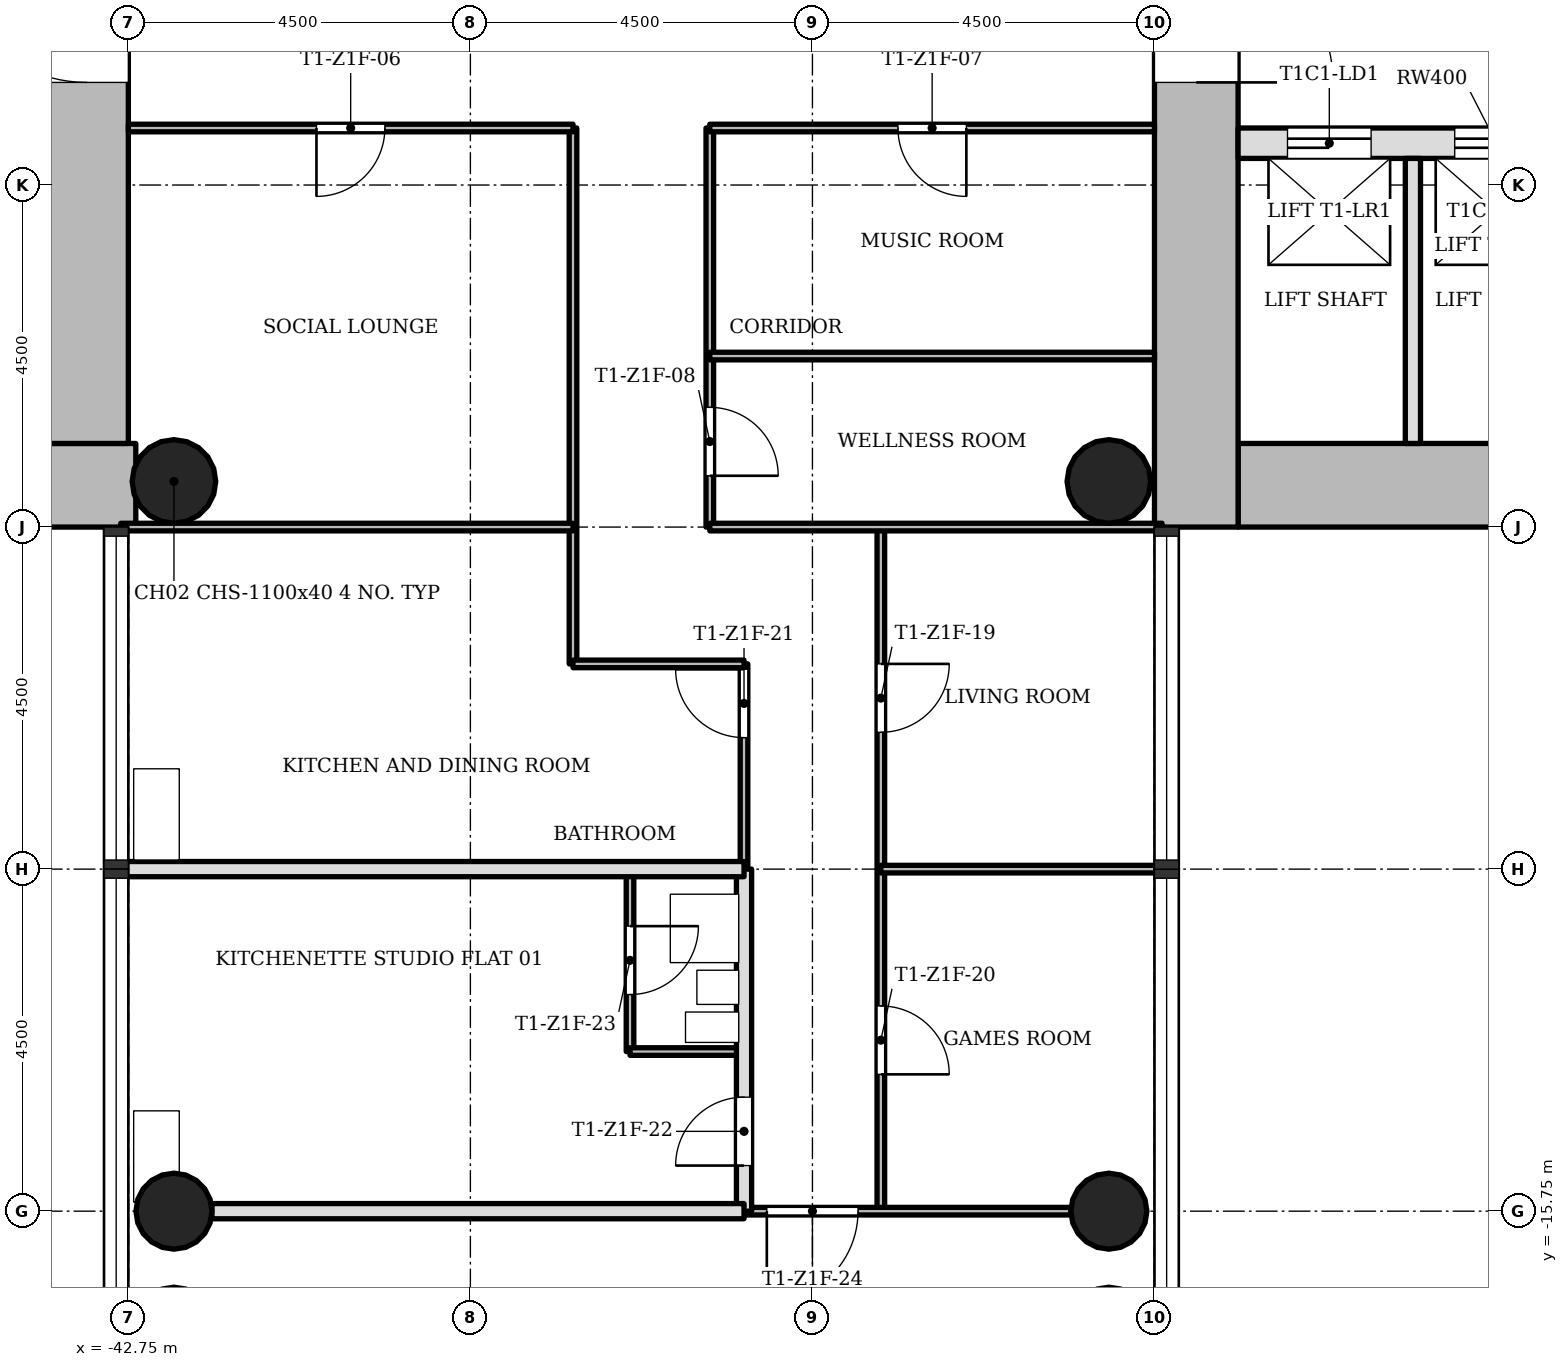
"""IFC4 building model, lengths in metres.
Left out: names, types, materials, properties, quantities, classifications, styles, units other than length and angle.
Written with IfcOpenShell. Run it as: python <this file> out.ifc"""

import sys

from ifc_helpers import new_model, si_unit, direction, frame, frame_2d, origin, origin_2d, place, context, subcontext, project, spatial, rectangle, hollow_circle, extrude, element, fill, save


model = new_model("IFC4")
c1 = context("Model", 3, precision=1e-05, world=origin(), true_north=direction((0.0, 1.0)))
c2 = subcontext(c1, "Body", "Model", "MODEL_VIEW")
j1 = project(units=[si_unit("LENGTHUNIT", "METRE"), si_unit("PLANEANGLEUNIT", "RADIAN")], contexts=[c1])
p1 = place(None, origin())
s1 = spatial("IfcSite", under=j1, at=p1, CompositionType="ELEMENT")
p2 = place(p1, origin())
s2 = spatial("IfcBuilding", under=s1, at=p2, CompositionType="ELEMENT")
p3 = place(p2, frame((0.0, 0.0, 68.7)))
s3 = spatial("IfcBuildingStorey", under=s2, at=p3, CompositionType="ELEMENT", Elevation=68.7)
p4 = place(p3, frame((-28.15, -6.2, 0.0), z_axis=(0.0, 0.0, 1.0), x_axis=(1.0, 0.0, 0.0)))
e1 = element("IfcWall", 1, at=p4, inside=s3, PredefinedType="SHEAR", context=c2, shape_type="SweptSolid", body=[
    extrude(rectangle(XDim=7.9, YDim=1.1, at=frame_2d((3.95, 0.0))), origin(), (0.0, 0.0, 1.0), 3.4),
])
p5 = place(p3, frame((-28.7, 5.65, 0.0), z_axis=(0.0, 0.0, 1.0), x_axis=(0.0, -1.0, 0.0)))
e2 = element("IfcWall", 2, at=p5, inside=s3, PredefinedType="SHEAR", context=c2, shape_type="SweptSolid", body=[
    extrude(rectangle(XDim=12.4, YDim=1.1, at=frame_2d((6.2, 0.0))), origin(), (0.0, 0.0, 1.0), 3.4),
])
p6 = place(p5, frame((4.75, 0.0, 0.0)))
e3 = element("IfcOpeningElement", 3, at=p6, cuts=e2, PredefinedType="OPENING", context=c2, shape_type="SweptSolid", body=[
    extrude(rectangle(XDim=1.8, YDim=2.1, at=frame_2d((0.9, 1.05))), frame((0.0, 0.56, 0.0), z_axis=(0.0, -1.0, 0.0), x_axis=(1.0, 0.0, 0.0)), (0.0, 0.0, 1.0), 1.12),
])
p7 = place(p3, frame((-28.15, -1.7, 0.0), z_axis=(0.0, 0.0, 1.0), x_axis=(1.0, 0.0, 0.0)))
e4 = element("IfcWall", 4, at=p7, inside=s3, PredefinedType="SHEAR", context=c2, shape_type="SweptSolid", body=[
    extrude(rectangle(XDim=6.8, YDim=0.4, at=frame_2d((3.4, 0.0))), origin(), (0.0, 0.0, 1.0), 3.4),
])
p8 = place(p7, frame((0.65, 0.0, 0.0)))
e5 = element("IfcOpeningElement", 5, at=p8, cuts=e4, PredefinedType="OPENING", context=c2, shape_type="SweptSolid", body=[
    extrude(rectangle(XDim=1.1, YDim=2.1, at=frame_2d((0.55, 1.05))), frame((0.0, 0.21, 0.0), z_axis=(0.0, -1.0, 0.0), x_axis=(1.0, 0.0, 0.0)), (0.0, 0.0, 1.0), 0.42),
])
p9 = place(p7, frame((2.85, 0.0, 0.0)))
e6 = element("IfcOpeningElement", 6, at=p9, cuts=e4, PredefinedType="OPENING", context=c2, shape_type="SweptSolid", body=[
    extrude(rectangle(XDim=1.1, YDim=2.1, at=frame_2d((0.55, 1.05))), frame((0.0, 0.21, 0.0), z_axis=(0.0, -1.0, 0.0), x_axis=(1.0, 0.0, 0.0)), (0.0, 0.0, 1.0), 0.42),
])
p10 = place(p7, frame((5.05, 0.0, 0.0)))
e7 = element("IfcOpeningElement", 7, at=p10, cuts=e4, PredefinedType="OPENING", context=c2, shape_type="SweptSolid", body=[
    extrude(rectangle(XDim=1.1, YDim=2.1, at=frame_2d((0.55, 1.05))), frame((0.0, 0.21, 0.0), z_axis=(0.0, -1.0, 0.0), x_axis=(1.0, 0.0, 0.0)), (0.0, 0.0, 1.0), 0.42),
])
p11 = place(p3, frame((-50.65, -6.2, 0.0), z_axis=(0.0, 0.0, 1.0), x_axis=(1.0, 0.0, 0.0)))
e8 = element("IfcWall", 8, at=p11, inside=s3, PredefinedType="SHEAR", context=c2, shape_type="SweptSolid", body=[
    extrude(rectangle(XDim=7.998, YDim=1.1, at=frame_2d((3.999, 0.0))), origin(), (0.0, 0.0, 1.0), 3.4),
])
p12 = place(p3, frame((-43.3, -5.65, 0.0), z_axis=(0.0, 0.0, 1.0), x_axis=(0.0, 1.0, 0.0)))
e9 = element("IfcWall", 9, at=p12, inside=s3, PredefinedType="SHEAR", context=c2, shape_type="SweptSolid", body=[
    extrude(rectangle(XDim=12.4, YDim=1.1, at=frame_2d((6.2, 0.0))), origin(), (0.0, 0.0, 1.0), 3.4),
])
p13 = place(p12, frame((4.75, 0.0, 0.0)))
e10 = element("IfcOpeningElement", 10, at=p13, cuts=e9, PredefinedType="OPENING", context=c2, shape_type="SweptSolid", body=[
    extrude(rectangle(XDim=1.8, YDim=2.1, at=frame_2d((0.9, 1.05))), frame((0.0, 0.56, 0.0), z_axis=(0.0, -1.0, 0.0), x_axis=(1.0, 0.0, 0.0)), (0.0, 0.0, 1.0), 1.12),
])
for number, where, z_axis, x_axis in (
    (11, (-42.15, -15.75, 0.0), (0.0, 0.0, 1.0), (1.0, 0.0, 0.0)),
    (12, (-29.85, -15.75, 0.0), (0.0, 0.0, 1.0), (1.0, 0.0, 0.0)),
):
    element("IfcColumn", number, at=place(p3, frame(where, z_axis=z_axis, x_axis=x_axis)), inside=s3, PredefinedType="COLUMN", context=c2, shape_type="SweptSolid", body=[
        extrude(hollow_circle(Radius=0.5, WallThickness=0.036, at=origin_2d()), origin(), (0.0, 0.0, 1.0), 3.4),
    ])
for number, where, z_axis, x_axis in (
    (13, (-42.15, -6.15, 0.0), (0.0, 0.0, 1.0), (1.0, 0.0, 0.0)),
    (14, (-29.85, -6.15, 0.0), (0.0, 0.0, 1.0), (1.0, 0.0, 0.0)),
):
    element("IfcColumn", number, at=place(p3, frame(where, z_axis=z_axis, x_axis=x_axis)), inside=s3, PredefinedType="COLUMN", context=c2, shape_type="SweptSolid", body=[
        extrude(hollow_circle(Radius=0.55, WallThickness=0.04, at=origin_2d()), origin(), (0.0, 0.0, 1.0), 3.4),
    ])
p14 = place(p3, frame((-25.85, -5.65, 0.0), z_axis=(0.0, 0.0, 1.0), x_axis=(0.0, 1.0, 0.0)))
e15 = element("IfcWall", 15, at=p14, inside=s3, PredefinedType="SOLIDWALL", context=c2, shape_type="SweptSolid", body=[
    extrude(rectangle(XDim=3.75, YDim=0.2, at=frame_2d((1.875, 0.0))), origin(), (0.0, 0.0, 1.0), 3.0),
])
p15 = place(p3, frame((-36.9, -8.55, 0.0), z_axis=(0.0, 0.0, 1.0), x_axis=(0.0, 1.0, 0.0)))
e16 = element("IfcWall", 16, at=p15, inside=s3, PredefinedType="PARTITIONING", context=c2, shape_type="SweptSolid", body=[
    extrude(rectangle(XDim=7.05, YDim=0.1, at=frame_2d((3.525, 0.0))), origin(), (0.0, 0.0, 1.0), 3.0),
])
p16 = place(p3, frame((-36.15, -13.65, 0.0), z_axis=(0.0, 0.0, 1.0), x_axis=(0.0, 1.0, 0.0)))
e17 = element("IfcWall", 17, at=p16, inside=s3, PredefinedType="PARTITIONING", context=c2, shape_type="SweptSolid", body=[
    extrude(rectangle(XDim=2.4, YDim=0.1, at=frame_2d((1.2, 0.0))), origin(), (0.0, 0.0, 1.0), 3.0),
])
p17 = place(p16, frame((0.75, 0.0, 0.0)))
e18 = element("IfcOpeningElement", 18, at=p17, cuts=e17, PredefinedType="OPENING", context=c2, shape_type="SweptSolid", body=[
    extrude(rectangle(XDim=0.9, YDim=2.1, at=frame_2d((0.45, 1.05))), frame((0.0, 0.06, 0.0), z_axis=(0.0, -1.0, 0.0), x_axis=(1.0, 0.0, 0.0)), (0.0, 0.0, 1.0), 0.12),
])
p18 = place(p3, frame((-35.1, -6.75, 0.0), z_axis=(0.0, 0.0, 1.0), x_axis=(0.0, 1.0, 0.0)))
e19 = element("IfcWall", 19, at=p18, inside=s3, PredefinedType="PARTITIONING", context=c2, shape_type="SweptSolid", body=[
    extrude(rectangle(XDim=5.25, YDim=0.1, at=frame_2d((2.625, 0.0))), origin(), (0.0, 0.0, 1.0), 3.0),
])
p19 = place(p18, frame((0.675, 0.0, 0.0)))
e20 = element("IfcOpeningElement", 20, at=p19, cuts=e19, PredefinedType="OPENING", context=c2, shape_type="SweptSolid", body=[
    extrude(rectangle(XDim=0.9, YDim=2.1, at=frame_2d((0.45, 1.05))), frame((0.0, 0.06, 0.0), z_axis=(0.0, -1.0, 0.0), x_axis=(1.0, 0.0, 0.0)), (0.0, 0.0, 1.0), 0.12),
])
p20 = place(p3, frame((-34.65, -11.25, 0.0), z_axis=(0.0, 0.0, 1.0), x_axis=(0.0, 1.0, 0.0)))
e21 = element("IfcWall", 21, at=p20, inside=s3, PredefinedType="PARTITIONING", context=c2, shape_type="SweptSolid", body=[
    extrude(rectangle(XDim=2.7, YDim=0.1, at=frame_2d((1.35, 0.0))), origin(), (0.0, 0.0, 1.0), 3.0),
])
p21 = place(p20, frame((1.73, 0.0, 0.0)))
e22 = element("IfcOpeningElement", 22, at=p21, cuts=e21, PredefinedType="OPENING", context=c2, shape_type="SweptSolid", body=[
    extrude(rectangle(XDim=0.9, YDim=2.1, at=frame_2d((0.45, 1.05))), frame((0.0, 0.06, 0.0), z_axis=(0.0, -1.0, 0.0), x_axis=(1.0, 0.0, 0.0)), (0.0, 0.0, 1.0), 0.12),
])
p22 = place(p3, frame((-34.65, -15.75, 0.0), z_axis=(0.0, 0.0, 1.0), x_axis=(0.0, 1.0, 0.0)))
e23 = element("IfcWall", 23, at=p22, inside=s3, PredefinedType="SOLIDWALL", context=c2, shape_type="SweptSolid", body=[
    extrude(rectangle(XDim=4.5, YDim=0.2, at=frame_2d((2.25, 0.0))), origin(), (0.0, 0.0, 1.0), 3.0),
])
p23 = place(p22, frame((0.6, 0.0, 0.0)))
e24 = element("IfcOpeningElement", 24, at=p23, cuts=e23, PredefinedType="OPENING", context=c2, shape_type="SweptSolid", body=[
    extrude(rectangle(XDim=0.9, YDim=2.1, at=frame_2d((0.45, 1.05))), frame((0.0, 0.11, 0.0), z_axis=(0.0, -1.0, 0.0), x_axis=(1.0, 0.0, 0.0)), (0.0, 0.0, 1.0), 0.22),
])
p24 = place(p3, frame((-32.85, -15.75, 0.0), z_axis=(0.0, 0.0, 1.0), x_axis=(0.0, 1.0, 0.0)))
e25 = element("IfcWall", 25, at=p24, inside=s3, PredefinedType="PARTITIONING", context=c2, shape_type="SweptSolid", body=[
    extrude(rectangle(XDim=9.0, YDim=0.1, at=frame_2d((4.5, 0.0))), origin(), (0.0, 0.0, 1.0), 3.0),
])
p25 = place(p24, frame((6.3, 0.0, 0.0)))
e26 = element("IfcOpeningElement", 26, at=p25, cuts=e25, PredefinedType="OPENING", context=c2, shape_type="SweptSolid", body=[
    extrude(rectangle(XDim=0.9, YDim=2.1, at=frame_2d((0.45, 1.05))), frame((0.0, 0.06, 0.0), z_axis=(0.0, -1.0, 0.0), x_axis=(1.0, 0.0, 0.0)), (0.0, 0.0, 1.0), 0.12),
])
p26 = place(p24, frame((1.8, 0.0, 0.0)))
e27 = element("IfcOpeningElement", 27, at=p26, cuts=e25, PredefinedType="OPENING", context=c2, shape_type="SweptSolid", body=[
    extrude(rectangle(XDim=0.9, YDim=2.1, at=frame_2d((0.45, 1.05))), frame((0.0, 0.06, 0.0), z_axis=(0.0, -1.0, 0.0), x_axis=(1.0, 0.0, 0.0)), (0.0, 0.0, 1.0), 0.12),
])
p27 = place(p3, frame((-34.65, -15.75, 0.0), z_axis=(0.0, 0.0, 1.0), x_axis=(1.0, 0.0, 0.0)))
e28 = element("IfcWall", 28, at=p27, inside=s3, PredefinedType="PARTITIONING", context=c2, shape_type="SweptSolid", body=[
    extrude(rectangle(XDim=4.3, YDim=0.1, at=frame_2d((2.15, 0.0))), origin(), (0.0, 0.0, 1.0), 3.0),
])
p28 = place(p27, frame((0.3, 0.0, 0.0)))
e29 = element("IfcOpeningElement", 29, at=p28, cuts=e28, PredefinedType="OPENING", context=c2, shape_type="SweptSolid", body=[
    extrude(rectangle(XDim=1.2, YDim=2.1, at=frame_2d((0.6, 1.05))), frame((0.0, 0.06, 0.0), z_axis=(0.0, -1.0, 0.0), x_axis=(1.0, 0.0, 0.0)), (0.0, 0.0, 1.0), 0.12),
])
p29 = place(p3, frame((-41.65, -15.75, 0.0), z_axis=(0.0, 0.0, 1.0), x_axis=(1.0, 0.0, 0.0)))
e30 = element("IfcWall", 30, at=p29, inside=s3, PredefinedType="SOLIDWALL", context=c2, shape_type="SweptSolid", body=[
    extrude(rectangle(XDim=7.0, YDim=0.2, at=frame_2d((3.5, 0.0))), origin(), (0.0, 0.0, 1.0), 3.0),
])
p30 = place(p3, frame((-36.15, -13.65, 0.0), z_axis=(0.0, 0.0, 1.0), x_axis=(1.0, 0.0, 0.0)))
e31 = element("IfcWall", 31, at=p30, inside=s3, PredefinedType="PARTITIONING", context=c2, shape_type="SweptSolid", body=[
    extrude(rectangle(XDim=1.5, YDim=0.1, at=frame_2d((0.75, 0.0))), origin(), (0.0, 0.0, 1.0), 3.0),
])
p31 = place(p3, frame((-32.85, -11.25, 0.0), z_axis=(0.0, 0.0, 1.0), x_axis=(1.0, 0.0, 0.0)))
e32 = element("IfcWall", 32, at=p31, inside=s3, PredefinedType="PARTITIONING", context=c2, shape_type="SweptSolid", body=[
    extrude(rectangle(XDim=3.7, YDim=0.1, at=frame_2d((1.85, 0.0))), origin(), (0.0, 0.0, 1.0), 3.0),
])
p32 = place(p3, frame((-42.85, -11.25, 0.0), z_axis=(0.0, 0.0, 1.0), x_axis=(1.0, 0.0, 0.0)))
e33 = element("IfcWall", 33, at=p32, inside=s3, PredefinedType="SOLIDWALL", context=c2, shape_type="SweptSolid", body=[
    extrude(rectangle(XDim=8.2, YDim=0.2, at=frame_2d((4.1, 0.0))), origin(), (0.0, 0.0, 1.0), 3.0),
])
p33 = place(p3, frame((-36.9, -8.55, 0.0), z_axis=(0.0, 0.0, 1.0), x_axis=(1.0, 0.0, 0.0)))
e34 = element("IfcWall", 34, at=p33, inside=s3, PredefinedType="PARTITIONING", context=c2, shape_type="SweptSolid", body=[
    extrude(rectangle(XDim=2.25, YDim=0.1, at=frame_2d((1.125, 0.0))), origin(), (0.0, 0.0, 1.0), 3.0),
])
for number, where, z_axis, x_axis in (
    (35, (-42.85, -6.75, 0.0), (0.0, 0.0, 1.0), (1.0, 0.0, 0.0)),
    (36, (-35.1, -6.75, 0.0), (0.0, 0.0, 1.0), (1.0, 0.0, 0.0)),
):
    element("IfcWall", number, at=place(p3, frame(where, z_axis=z_axis, x_axis=x_axis)), inside=s3, PredefinedType="PARTITIONING", context=c2, shape_type="SweptSolid", body=[
        extrude(rectangle(XDim=5.95, YDim=0.1, at=frame_2d((2.975, 0.0))), origin(), (0.0, 0.0, 1.0), 3.0),
    ])
p34 = place(p3, frame((-35.1, -4.5, 0.0), z_axis=(0.0, 0.0, 1.0), x_axis=(1.0, 0.0, 0.0)))
e37 = element("IfcWall", 37, at=p34, inside=s3, PredefinedType="PARTITIONING", context=c2, shape_type="SweptSolid", body=[
    extrude(rectangle(XDim=5.85, YDim=0.1, at=frame_2d((2.925, 0.0))), origin(), (0.0, 0.0, 1.0), 3.0),
])
p35 = place(p3, frame((-42.75, -1.5, 0.0), z_axis=(0.0, 0.0, 1.0), x_axis=(1.0, 0.0, 0.0)))
e38 = element("IfcWall", 38, at=p35, inside=s3, PredefinedType="PARTITIONING", context=c2, shape_type="SweptSolid", body=[
    extrude(rectangle(XDim=5.85, YDim=0.1, at=frame_2d((2.925, 0.0))), origin(), (0.0, 0.0, 1.0), 3.0),
])
p36 = place(p35, frame((2.475, 0.0, 0.0)))
e39 = element("IfcOpeningElement", 39, at=p36, cuts=e38, PredefinedType="OPENING", context=c2, shape_type="SweptSolid", body=[
    extrude(rectangle(XDim=0.9, YDim=2.1, at=frame_2d((0.45, 1.05))), frame((0.0, 0.06, 0.0), z_axis=(0.0, -1.0, 0.0), x_axis=(1.0, 0.0, 0.0)), (0.0, 0.0, 1.0), 0.12),
])
p37 = place(p3, frame((-35.1, -1.5, 0.0), z_axis=(0.0, 0.0, 1.0), x_axis=(1.0, 0.0, 0.0)))
e40 = element("IfcWall", 40, at=p37, inside=s3, PredefinedType="PARTITIONING", context=c2, shape_type="SweptSolid", body=[
    extrude(rectangle(XDim=5.85, YDim=0.1, at=frame_2d((2.925, 0.0))), origin(), (0.0, 0.0, 1.0), 3.0),
])
p38 = place(p37, frame((2.475, 0.0, 0.0)))
e41 = element("IfcOpeningElement", 41, at=p38, cuts=e40, PredefinedType="OPENING", context=c2, shape_type="SweptSolid", body=[
    extrude(rectangle(XDim=0.9, YDim=2.1, at=frame_2d((0.45, 1.05))), frame((0.0, 0.06, 0.0), z_axis=(0.0, -1.0, 0.0), x_axis=(1.0, 0.0, 0.0)), (0.0, 0.0, 1.0), 0.12),
])
p39 = place(p36, origin())
e42 = element("IfcDoor", 42, at=p39, inside=s3, OperationType="SINGLE_SWING_LEFT", PredefinedType="DOOR", context=c2, shape_type="SweptSolid", body=[
    extrude(rectangle(XDim=0.9, YDim=2.1, at=frame_2d((0.45, 1.05))), frame((0.0, 0.025, 0.0), z_axis=(0.0, -1.0, 0.0), x_axis=(1.0, 0.0, 0.0)), (0.0, 0.0, 1.0), 0.05),
])
fill(e39, e42)
p40 = place(p38, origin())
e43 = element("IfcDoor", 43, at=p40, inside=s3, OperationType="SINGLE_SWING_RIGHT", PredefinedType="DOOR", context=c2, shape_type="SweptSolid", body=[
    extrude(rectangle(XDim=0.9, YDim=2.1, at=frame_2d((0.45, 1.05))), frame((0.0, 0.025, 0.0), z_axis=(0.0, -1.0, 0.0), x_axis=(1.0, 0.0, 0.0)), (0.0, 0.0, 1.0), 0.05),
])
fill(e41, e43)
p41 = place(p19, origin())
e44 = element("IfcDoor", 44, at=p41, inside=s3, OperationType="SINGLE_SWING_LEFT", PredefinedType="DOOR", context=c2, shape_type="SweptSolid", body=[
    extrude(rectangle(XDim=0.9, YDim=2.1, at=frame_2d((0.45, 1.05))), frame((0.0, 0.025, 0.0), z_axis=(0.0, -1.0, 0.0), x_axis=(1.0, 0.0, 0.0)), (0.0, 0.0, 1.0), 0.05),
])
fill(e20, e44)
p42 = place(p25, origin())
e45 = element("IfcDoor", 45, at=p42, inside=s3, OperationType="SINGLE_SWING_RIGHT", PredefinedType="DOOR", context=c2, shape_type="SweptSolid", body=[
    extrude(rectangle(XDim=0.9, YDim=2.1, at=frame_2d((0.45, 1.05))), frame((0.0, 0.025, 0.0), z_axis=(0.0, -1.0, 0.0), x_axis=(1.0, 0.0, 0.0)), (0.0, 0.0, 1.0), 0.05),
])
fill(e26, e45)
p43 = place(p26, origin())
e46 = element("IfcDoor", 46, at=p43, inside=s3, OperationType="SINGLE_SWING_LEFT", PredefinedType="DOOR", context=c2, shape_type="SweptSolid", body=[
    extrude(rectangle(XDim=0.9, YDim=2.1, at=frame_2d((0.45, 1.05))), frame((0.0, 0.025, 0.0), z_axis=(0.0, -1.0, 0.0), x_axis=(1.0, 0.0, 0.0)), (0.0, 0.0, 1.0), 0.05),
])
fill(e27, e46)
p44 = place(p21, origin())
e47 = element("IfcDoor", 47, at=p44, inside=s3, OperationType="SINGLE_SWING_LEFT", PredefinedType="DOOR", context=c2, shape_type="SweptSolid", body=[
    extrude(rectangle(XDim=0.9, YDim=2.1, at=frame_2d((0.45, 1.05))), frame((0.0, 0.025, 0.0), z_axis=(0.0, -1.0, 0.0), x_axis=(1.0, 0.0, 0.0)), (0.0, 0.0, 1.0), 0.05),
])
fill(e22, e47)
p45 = place(p23, origin())
e48 = element("IfcDoor", 48, at=p45, inside=s3, OperationType="SINGLE_SWING_RIGHT", PredefinedType="DOOR", context=c2, shape_type="SweptSolid", body=[
    extrude(rectangle(XDim=0.9, YDim=2.1, at=frame_2d((0.45, 1.05))), frame((0.0, 0.025, 0.0), z_axis=(0.0, -1.0, 0.0), x_axis=(1.0, 0.0, 0.0)), (0.0, 0.0, 1.0), 0.05),
])
fill(e24, e48)
p46 = place(p17, origin())
e49 = element("IfcDoor", 49, at=p46, inside=s3, OperationType="SINGLE_SWING_RIGHT", PredefinedType="DOOR", context=c2, shape_type="SweptSolid", body=[
    extrude(rectangle(XDim=0.9, YDim=2.1, at=frame_2d((0.45, 1.05))), frame((0.0, 0.025, 0.0), z_axis=(0.0, -1.0, 0.0), x_axis=(1.0, 0.0, 0.0)), (0.0, 0.0, 1.0), 0.05),
])
fill(e18, e49)
p47 = place(p28, origin())
e50 = element("IfcDoor", 50, at=p47, inside=s3, OperationType="SINGLE_SWING_LEFT", PredefinedType="DOOR", context=c2, shape_type="SweptSolid", body=[
    extrude(rectangle(XDim=1.2, YDim=2.1, at=frame_2d((0.6, 1.05))), frame((0.0, 0.025, 0.0), z_axis=(0.0, -1.0, 0.0), x_axis=(1.0, 0.0, 0.0)), (0.0, 0.0, 1.0), 0.05),
])
fill(e29, e50)
p48 = place(p8, origin())
e51 = element("IfcDoor", 51, at=p48, inside=s3, OperationType="SLIDING_TO_LEFT", PredefinedType="DOOR", context=c2, shape_type="SweptSolid", body=[
    extrude(rectangle(XDim=1.1, YDim=2.1, at=frame_2d((0.55, 1.05))), frame((0.0, 0.025, 0.0), z_axis=(0.0, -1.0, 0.0), x_axis=(1.0, 0.0, 0.0)), (0.0, 0.0, 1.0), 0.05),
])
fill(e5, e51)
p49 = place(p9, origin())
e52 = element("IfcDoor", 52, at=p49, inside=s3, OperationType="SLIDING_TO_LEFT", PredefinedType="DOOR", context=c2, shape_type="SweptSolid", body=[
    extrude(rectangle(XDim=1.1, YDim=2.1, at=frame_2d((0.55, 1.05))), frame((0.0, 0.025, 0.0), z_axis=(0.0, -1.0, 0.0), x_axis=(1.0, 0.0, 0.0)), (0.0, 0.0, 1.0), 0.05),
])
fill(e6, e52)
p50 = place(p6, origin())
e53 = element("IfcDoor", 53, at=p50, inside=s3, OperationType="SINGLE_SWING_LEFT", PredefinedType="DOOR", context=c2, shape_type="SweptSolid", body=[
    extrude(rectangle(XDim=1.8, YDim=2.1, at=frame_2d((0.9, 1.05))), frame((0.0, 0.025, 0.0), z_axis=(0.0, -1.0, 0.0), x_axis=(1.0, 0.0, 0.0)), (0.0, 0.0, 1.0), 0.05),
])
fill(e3, e53)
p51 = place(p13, origin())
e54 = element("IfcDoor", 54, at=p51, inside=s3, OperationType="SINGLE_SWING_LEFT", PredefinedType="DOOR", context=c2, shape_type="SweptSolid", body=[
    extrude(rectangle(XDim=1.8, YDim=2.1, at=frame_2d((0.9, 1.05))), frame((0.0, 0.025, 0.0), z_axis=(0.0, -1.0, 0.0), x_axis=(1.0, 0.0, 0.0)), (0.0, 0.0, 1.0), 0.05),
])
fill(e10, e54)
save(model, sys.argv[1])
